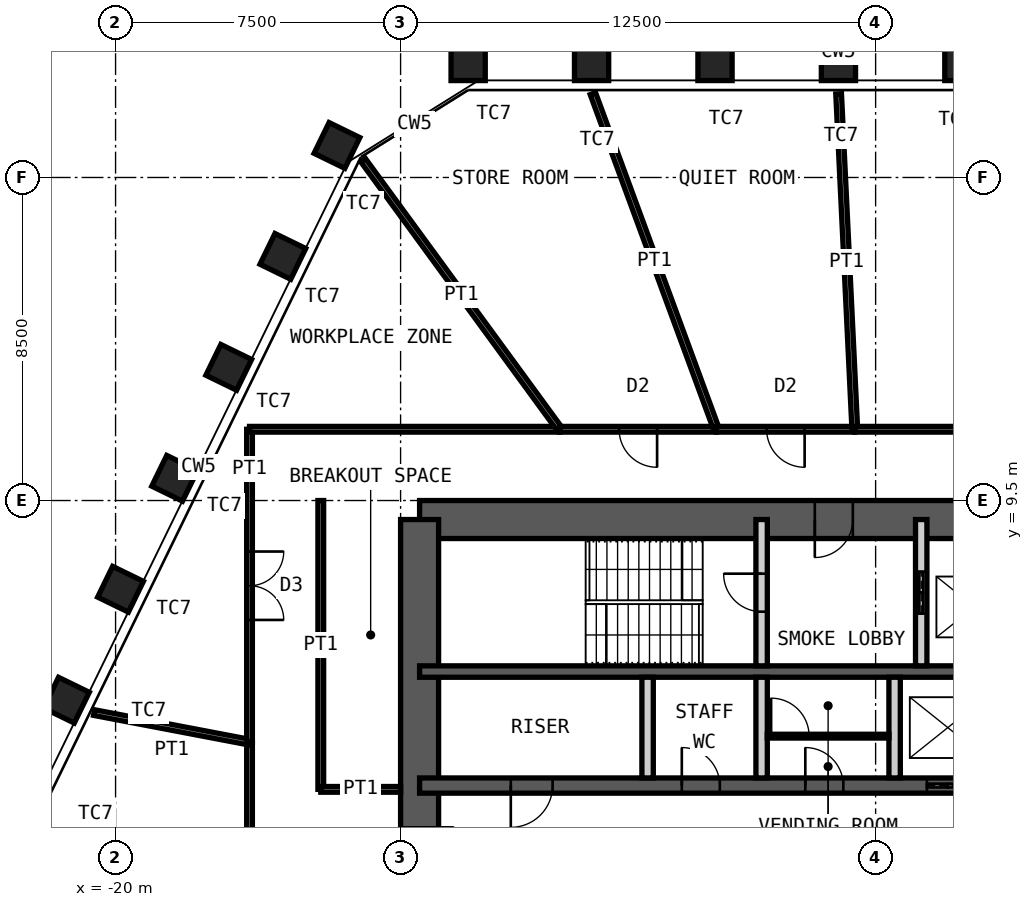
"""IFC4 building model, lengths in metres.
Left out: names, types, materials, properties, quantities, classifications, styles, units other than length and angle.
Written with IfcOpenShell. Run it as: python <this file> out.ifc"""

import sys

from ifc_helpers import new_model, si_unit, direction, frame, frame_2d, origin, origin_2d, place, context, subcontext, project, spatial, rectangle, hollow_rectangle, extrude, element, fill, save


model = new_model("IFC4")
c1 = context("Model", 3, precision=1e-05, world=origin(), true_north=direction((0.0, 1.0)))
c2 = subcontext(c1, "Body", "Model", "MODEL_VIEW")
j1 = project(units=[si_unit("LENGTHUNIT", "METRE"), si_unit("PLANEANGLEUNIT", "RADIAN")], contexts=[c1])
p1 = place(None, origin())
s1 = spatial("IfcSite", under=j1, at=p1, CompositionType="ELEMENT")
p2 = place(p1, origin())
s2 = spatial("IfcBuilding", under=s1, at=p2, CompositionType="ELEMENT")
p3 = place(p2, frame((0.0, 0.0, 270.4)))
s3 = spatial("IfcBuildingStorey", under=s2, at=p3, CompositionType="ELEMENT", Elevation=270.4)
for number, where, z_axis, x_axis in (
    (1, (-10.722, 21.0, 0.0), (0.0, 0.0, 1.0), (-1.0, 0.0, 0.0)),
    (2, (-7.474, 21.0, 0.0), (0.0, 0.0, 1.0), (-1.0, 0.0, 0.0)),
    (3, (-4.226, 21.0, 0.0), (0.0, 0.0, 1.0), (-1.0, 0.0, 0.0)),
    (4, (-0.978, 21.0, 0.0), (0.0, 0.0, 1.0), (-1.0, 0.0, 0.0)),
    (5, (2.27, 21.0, 0.0), (0.0, 0.0, 1.0), (-1.0, 0.0, 0.0)),
    (6, (-21.293, 4.246, 0.0), (0.0, 0.0, 1.0), (-0.438, -0.899, 0.0)),
    (7, (-19.87, 7.166, 0.0), (0.0, 0.0, 1.0), (-0.438, -0.899, 0.0)),
    (8, (-18.446, 10.085, 0.0), (0.0, 0.0, 1.0), (-0.438, -0.899, 0.0)),
    (9, (-17.022, 13.004, 0.0), (0.0, 0.0, 1.0), (-0.438, -0.899, 0.0)),
    (10, (-15.598, 15.924, 0.0), (0.0, 0.0, 1.0), (-0.438, -0.899, 0.0)),
    (11, (-14.174, 18.843, 0.0), (0.0, 0.0, 1.0), (-0.438, -0.899, 0.0)),
):
    element("IfcColumn", number, at=place(p3, frame(where, z_axis=z_axis, x_axis=x_axis)), inside=s3, PredefinedType="COLUMN", context=c2, shape_type="SweptSolid", body=[
        extrude(hollow_rectangle(XDim=0.9, YDim=0.9, WallThickness=0.06, at=origin_2d()), origin(), (0.0, 0.0, 1.0), 4.2),
    ])
p4 = place(p3, frame((-12.0, 9.0, 0.0), z_axis=(0.0, 0.0, 1.0), x_axis=(1.0, 0.0, 0.0)))
e12 = element("IfcWall", 12, at=p4, inside=s3, PredefinedType="SHEAR", context=c2, shape_type="SweptSolid", body=[
    extrude(rectangle(XDim=24.0, YDim=1.0, at=frame_2d((12.0, 0.0))), origin(), (0.0, 0.0, 1.0), 4.2),
])
p5 = place(p4, frame((10.4, 0.0, 0.0)))
e13 = element("IfcOpeningElement", 13, at=p5, cuts=e12, PredefinedType="OPENING", context=c2, shape_type="SweptSolid", body=[
    extrude(rectangle(XDim=1.0, YDim=2.1, at=frame_2d((0.5, 1.05))), frame((0.0, 0.51, 0.0), z_axis=(0.0, -1.0, 0.0), x_axis=(1.0, 0.0, 0.0)), (0.0, 0.0, 1.0), 1.02),
])
p6 = place(p4, frame((17.6, 0.0, 0.0)))
e14 = element("IfcOpeningElement", 14, at=p6, cuts=e12, PredefinedType="OPENING", context=c2, shape_type="SweptSolid", body=[
    extrude(rectangle(XDim=0.9, YDim=2.1, at=frame_2d((0.45, 1.05))), frame((0.0, 0.51, 0.0), z_axis=(0.0, -1.0, 0.0), x_axis=(1.0, 0.0, 0.0)), (0.0, 0.0, 1.0), 1.02),
])
p7 = place(p4, frame((21.9, 0.0, 0.0)))
e15 = element("IfcOpeningElement", 15, at=p7, cuts=e12, PredefinedType="OPENING", context=c2, shape_type="SweptSolid", body=[
    extrude(rectangle(XDim=0.9, YDim=2.1, at=frame_2d((0.45, 1.05))), frame((0.0, 0.51, 0.0), z_axis=(0.0, -1.0, 0.0), x_axis=(1.0, 0.0, 0.0)), (0.0, 0.0, 1.0), 1.02),
])
p8 = place(p3, frame((-12.0, -9.0, 0.0), z_axis=(0.0, 0.0, 1.0), x_axis=(0.0, 1.0, 0.0)))
e16 = element("IfcWall", 16, at=p8, inside=s3, PredefinedType="SHEAR", context=c2, shape_type="SweptSolid", body=[
    extrude(rectangle(XDim=18.0, YDim=1.0, at=frame_2d((9.0, 0.0))), origin(), (0.0, 0.0, 1.0), 4.2),
])
p9 = place(p8, frame((8.1, 0.0, 0.0)))
e17 = element("IfcOpeningElement", 17, at=p9, cuts=e16, PredefinedType="OPENING", context=c2, shape_type="SweptSolid", body=[
    extrude(rectangle(XDim=1.8, YDim=2.1, at=frame_2d((0.9, 1.05))), frame((0.0, 0.51, 0.0), z_axis=(0.0, -1.0, 0.0), x_axis=(1.0, 0.0, 0.0)), (0.0, 0.0, 1.0), 1.02),
])
p10 = place(p3, frame((-12.0, 5.0, 0.0), z_axis=(0.0, 0.0, 1.0), x_axis=(1.0, 0.0, 0.0)))
e18 = element("IfcWall", 18, at=p10, inside=s3, PredefinedType="SHEAR", context=c2, shape_type="SweptSolid", body=[
    extrude(rectangle(XDim=24.0, YDim=0.3, at=frame_2d((12.0, 0.0))), origin(), (0.0, 0.0, 1.0), 4.2),
])
p11 = place(p3, frame((-12.0, 2.0, 0.0), z_axis=(0.0, 0.0, 1.0), x_axis=(1.0, 0.0, 0.0)))
e19 = element("IfcWall", 19, at=p11, inside=s3, PredefinedType="SHEAR", context=c2, shape_type="SweptSolid", body=[
    extrude(rectangle(XDim=24.0, YDim=0.4, at=frame_2d((12.0, 0.0))), origin(), (0.0, 0.0, 1.0), 4.2),
])
p12 = place(p11, frame((2.4, 0.0, 0.0)))
e20 = element("IfcOpeningElement", 20, at=p12, cuts=e19, PredefinedType="OPENING", context=c2, shape_type="SweptSolid", body=[
    extrude(rectangle(XDim=1.1, YDim=2.1, at=frame_2d((0.55, 1.05))), frame((0.0, 0.21, 0.0), z_axis=(0.0, -1.0, 0.0), x_axis=(1.0, 0.0, 0.0)), (0.0, 0.0, 1.0), 0.42),
])
p13 = place(p11, frame((22.0, 0.0, 0.0)))
e21 = element("IfcOpeningElement", 21, at=p13, cuts=e19, PredefinedType="OPENING", context=c2, shape_type="SweptSolid", body=[
    extrude(rectangle(XDim=1.1, YDim=2.1, at=frame_2d((0.55, 1.05))), frame((0.0, 0.21, 0.0), z_axis=(0.0, -1.0, 0.0), x_axis=(1.0, 0.0, 0.0)), (0.0, 0.0, 1.0), 0.42),
])
p14 = place(p11, frame((10.15, 0.0, 0.0)))
e22 = element("IfcOpeningElement", 22, at=p14, cuts=e19, PredefinedType="OPENING", context=c2, shape_type="SweptSolid", body=[
    extrude(rectangle(XDim=1.0, YDim=2.1, at=frame_2d((0.5, 1.05))), frame((0.0, 0.21, 0.0), z_axis=(0.0, -1.0, 0.0), x_axis=(1.0, 0.0, 0.0)), (0.0, 0.0, 1.0), 0.42),
])
p15 = place(p11, frame((6.9, 0.0, 0.0)))
e23 = element("IfcOpeningElement", 23, at=p15, cuts=e19, PredefinedType="OPENING", context=c2, shape_type="SweptSolid", body=[
    extrude(rectangle(XDim=1.0, YDim=2.1, at=frame_2d((0.5, 1.05))), frame((0.0, 0.21, 0.0), z_axis=(0.0, -1.0, 0.0), x_axis=(1.0, 0.0, 0.0)), (0.0, 0.0, 1.0), 0.42),
])
p16 = place(p11, frame((13.35, 0.0, 0.0)))
e24 = element("IfcOpeningElement", 24, at=p16, cuts=e19, PredefinedType="OPENING", context=c2, shape_type="SweptSolid", body=[
    extrude(rectangle(XDim=1.1, YDim=2.4, at=frame_2d((0.55, 1.2))), frame((0.0, 0.21, 0.0), z_axis=(0.0, -1.0, 0.0), x_axis=(1.0, 0.0, 0.0)), (0.0, 0.0, 1.0), 0.42),
])
p17 = place(p11, frame((16.15, 0.0, 0.0)))
e25 = element("IfcOpeningElement", 25, at=p17, cuts=e19, PredefinedType="OPENING", context=c2, shape_type="SweptSolid", body=[
    extrude(rectangle(XDim=1.1, YDim=2.4, at=frame_2d((0.55, 1.2))), frame((0.0, 0.21, 0.0), z_axis=(0.0, -1.0, 0.0), x_axis=(1.0, 0.0, 0.0)), (0.0, 0.0, 1.0), 0.42),
])
p18 = place(p11, frame((19.0, 0.0, 0.0)))
e26 = element("IfcOpeningElement", 26, at=p18, cuts=e19, PredefinedType="OPENING", context=c2, shape_type="SweptSolid", body=[
    extrude(rectangle(XDim=1.0, YDim=2.1, at=frame_2d((0.5, 1.05))), frame((0.0, 0.21, 0.0), z_axis=(0.0, -1.0, 0.0), x_axis=(1.0, 0.0, 0.0)), (0.0, 0.0, 1.0), 0.42),
])
p19 = place(p3, frame((-3.0, 5.15, 0.0), z_axis=(0.0, 0.0, 1.0), x_axis=(0.0, 1.0, 0.0)))
e27 = element("IfcWall", 27, at=p19, inside=s3, PredefinedType="PARTITIONING", context=c2, shape_type="SweptSolid", body=[
    extrude(rectangle(XDim=3.85, YDim=0.3, at=frame_2d((1.925, 0.0))), origin(), (0.0, 0.0, 1.0), 3.98),
])
p20 = place(p19, frame((1.425, 0.0, 0.0)))
e28 = element("IfcOpeningElement", 28, at=p20, cuts=e27, PredefinedType="OPENING", context=c2, shape_type="SweptSolid", body=[
    extrude(rectangle(XDim=1.0, YDim=2.1, at=frame_2d((0.5, 1.05))), frame((0.0, 0.16, 0.0), z_axis=(0.0, -1.0, 0.0), x_axis=(1.0, 0.0, 0.0)), (0.0, 0.0, 1.0), 0.32),
])
p21 = place(p3, frame((1.2, 5.15, 0.0), z_axis=(0.0, 0.0, 1.0), x_axis=(0.0, 1.0, 0.0)))
e29 = element("IfcWall", 29, at=p21, inside=s3, PredefinedType="PARTITIONING", context=c2, shape_type="SweptSolid", body=[
    extrude(rectangle(XDim=3.85, YDim=0.3, at=frame_2d((1.925, 0.0))), origin(), (0.0, 0.0, 1.0), 3.98),
])
p22 = place(p21, frame((1.375, 0.0, 0.0)))
e30 = element("IfcOpeningElement", 30, at=p22, cuts=e29, PredefinedType="OPENING", context=c2, shape_type="SweptSolid", body=[
    extrude(rectangle(XDim=1.1, YDim=2.4, at=frame_2d((0.55, 1.2))), frame((0.0, 0.16, 0.0), z_axis=(0.0, -1.0, 0.0), x_axis=(1.0, 0.0, 0.0)), (0.0, 0.0, 1.0), 0.32),
])
for number, where, z_axis, x_axis in (
    (31, (-6.0, 2.2, 0.0), (0.0, 0.0, 1.0), (0.0, 1.0, 0.0)),
    (32, (-3.0, 2.2, 0.0), (0.0, 0.0, 1.0), (0.0, 1.0, 0.0)),
    (33, (0.5, 2.2, 0.0), (0.0, 0.0, 1.0), (0.0, 1.0, 0.0)),
):
    element("IfcWall", number, at=place(p3, frame(where, z_axis=z_axis, x_axis=x_axis)), inside=s3, PredefinedType="PARTITIONING", context=c2, shape_type="SweptSolid", body=[
        extrude(rectangle(XDim=2.65, YDim=0.3, at=frame_2d((1.325, 0.0))), origin(), (0.0, 0.0, 1.0), 3.98),
    ])
p23 = place(p3, frame((-2.85, 3.3, 0.0), z_axis=(0.0, 0.0, 1.0), x_axis=(1.0, 0.0, 0.0)))
e34 = element("IfcWall", 34, at=p23, inside=s3, PredefinedType="PARTITIONING", context=c2, shape_type="SweptSolid", body=[
    extrude(rectangle(XDim=3.2, YDim=0.1, at=frame_2d((1.6, 0.0))), origin(), (0.0, 0.0, 1.0), 3.98),
])
p24 = place(p23, frame((0.1, 0.0, 0.0)))
e35 = element("IfcOpeningElement", 35, at=p24, cuts=e34, PredefinedType="OPENING", context=c2, shape_type="SweptSolid", body=[
    extrude(rectangle(XDim=1.0, YDim=2.4, at=frame_2d((0.5, 1.2))), frame((0.0, 0.06, 0.0), z_axis=(0.0, -1.0, 0.0), x_axis=(1.0, 0.0, 0.0)), (0.0, 0.0, 1.0), 0.12),
])
p25 = place(p3, frame((-16.475, -4.351, 0.0), z_axis=(0.0, 0.0, 1.0), x_axis=(0.0, 1.0, 0.0)))
e36 = element("IfcWall", 36, at=p25, inside=s3, PredefinedType="PARTITIONING", context=c2, shape_type="SweptSolid", body=[
    extrude(rectangle(XDim=7.492, YDim=0.15, at=frame_2d((3.746, 0.0))), origin(), (0.0, 0.0, 1.0), 4.03),
])
p26 = place(p25, frame((3.246, 0.0, 0.0)))
e37 = element("IfcOpeningElement", 37, at=p26, cuts=e36, PredefinedType="OPENING", context=c2, shape_type="SweptSolid", body=[
    extrude(rectangle(XDim=1.0, YDim=2.4, at=frame_2d((0.5, 1.2))), frame((0.0, 0.085, 0.0), z_axis=(0.0, -1.0, 0.0), x_axis=(1.0, 0.0, 0.0)), (0.0, 0.0, 1.0), 0.17),
])
p27 = place(p3, frame((-20.566, 3.921, 0.0), z_axis=(0.0, 0.0, 1.0), x_axis=(0.982304172816, -0.187292584123, 0.0)))
e38 = element("IfcWall", 38, at=p27, inside=s3, PredefinedType="PARTITIONING", context=c2, shape_type="SweptSolid", body=[
    extrude(rectangle(XDim=4.165, YDim=0.15, at=frame_2d((2.083, 0.0))), origin(), (0.0, 0.0, 1.0), 3.33),
])
p28 = place(p3, frame((-16.475, 3.141, 0.0), z_axis=(0.0, 0.0, 1.0), x_axis=(0.0, 1.0, 0.0)))
e39 = element("IfcWall", 39, at=p28, inside=s3, PredefinedType="PARTITIONING", context=c2, shape_type="SweptSolid", body=[
    extrude(rectangle(XDim=8.234, YDim=0.15, at=frame_2d((4.117, 0.0))), origin(), (0.0, 0.0, 1.0), 4.03),
])
p29 = place(p28, frame((3.217, 0.0, 0.0)))
e40 = element("IfcOpeningElement", 40, at=p29, cuts=e39, PredefinedType="OPENING", context=c2, shape_type="SweptSolid", body=[
    extrude(rectangle(XDim=1.8, YDim=2.4, at=frame_2d((0.9, 1.2))), frame((0.0, 0.085, 0.0), z_axis=(0.0, -1.0, 0.0), x_axis=(1.0, 0.0, 0.0)), (0.0, 0.0, 1.0), 0.17),
])
p30 = place(p3, frame((-16.475, 11.375, 0.0), z_axis=(0.0, 0.0, 1.0), x_axis=(1.0, 0.0, 0.0)))
e41 = element("IfcWall", 41, at=p30, inside=s3, PredefinedType="PARTITIONING", context=c2, shape_type="SweptSolid", body=[
    extrude(rectangle(XDim=8.163, YDim=0.15, at=frame_2d((4.082, 0.0))), origin(), (0.0, 0.0, 1.0), 4.03),
])
p31 = place(p3, frame((-13.486, 18.455, 0.0), z_axis=(0.0, 0.0, 1.0), x_axis=(0.589997742419, -0.807404894672, 0.0)))
e42 = element("IfcWall", 42, at=p31, inside=s3, PredefinedType="PARTITIONING", context=c2, shape_type="SweptSolid", body=[
    extrude(rectangle(XDim=8.769, YDim=0.15, at=frame_2d((4.385, 0.0))), origin(), (0.0, 0.0, 1.0), 2.93),
])
p32 = place(p3, frame((-8.312, 11.375, 0.0), z_axis=(0.0, 0.0, 1.0), x_axis=(1.0, 0.0, 0.0)))
e43 = element("IfcWall", 43, at=p32, inside=s3, PredefinedType="PARTITIONING", context=c2, shape_type="SweptSolid", body=[
    extrude(rectangle(XDim=4.124, YDim=0.15, at=frame_2d((2.062, 0.0))), origin(), (0.0, 0.0, 1.0), 4.03),
])
p33 = place(p32, frame((1.562, 0.0, 0.0)))
e44 = element("IfcOpeningElement", 44, at=p33, cuts=e43, PredefinedType="OPENING", context=c2, shape_type="SweptSolid", body=[
    extrude(rectangle(XDim=1.0, YDim=2.4, at=frame_2d((0.5, 1.2))), frame((0.0, 0.085, 0.0), z_axis=(0.0, -1.0, 0.0), x_axis=(1.0, 0.0, 0.0)), (0.0, 0.0, 1.0), 0.17),
])
p34 = place(p3, frame((-7.44, 20.206, 0.0), z_axis=(0.0, 0.0, 1.0), x_axis=(0.345510588088, -0.938414851502, 0.0)))
e45 = element("IfcWall", 45, at=p34, inside=s3, PredefinedType="PARTITIONING", context=c2, shape_type="SweptSolid", body=[
    extrude(rectangle(XDim=9.411, YDim=0.15, at=frame_2d((4.705, 0.0))), origin(), (0.0, 0.0, 1.0), 3.33),
])
p35 = place(p3, frame((-4.188, 11.375, 0.0), z_axis=(0.0, 0.0, 1.0), x_axis=(1.0, 0.0, 0.0)))
e46 = element("IfcWall", 46, at=p35, inside=s3, PredefinedType="PARTITIONING", context=c2, shape_type="SweptSolid", body=[
    extrude(rectangle(XDim=3.64, YDim=0.15, at=frame_2d((1.82, 0.0))), origin(), (0.0, 0.0, 1.0), 4.03),
])
p36 = place(p35, frame((1.32, 0.0, 0.0)))
e47 = element("IfcOpeningElement", 47, at=p36, cuts=e46, PredefinedType="OPENING", context=c2, shape_type="SweptSolid", body=[
    extrude(rectangle(XDim=1.0, YDim=2.4, at=frame_2d((0.5, 1.2))), frame((0.0, 0.085, 0.0), z_axis=(0.0, -1.0, 0.0), x_axis=(1.0, 0.0, 0.0)), (0.0, 0.0, 1.0), 0.17),
])
p37 = place(p3, frame((-0.973, 20.2, 0.0), z_axis=(0.0, 0.0, 1.0), x_axis=(0.048134910622, -0.998840843368, 0.0)))
e48 = element("IfcWall", 48, at=p37, inside=s3, PredefinedType="PARTITIONING", context=c2, shape_type="SweptSolid", body=[
    extrude(rectangle(XDim=8.835, YDim=0.15, at=frame_2d((4.418, 0.0))), origin(), (0.0, 0.0, 1.0), 3.33),
])
p38 = place(p3, frame((-0.548, 11.375, 0.0), z_axis=(0.0, 0.0, 1.0), x_axis=(1.0, 0.0, 0.0)))
e49 = element("IfcWall", 49, at=p38, inside=s3, PredefinedType="PARTITIONING", context=c2, shape_type="SweptSolid", body=[
    extrude(rectangle(XDim=10.365, YDim=0.15, at=frame_2d((5.182, 0.0))), origin(), (0.0, 0.0, 1.0), 4.03),
])
p39 = place(p38, frame((4.282, 0.0, 0.0)))
e50 = element("IfcOpeningElement", 50, at=p39, cuts=e49, PredefinedType="OPENING", context=c2, shape_type="SweptSolid", body=[
    extrude(rectangle(XDim=1.8, YDim=2.4, at=frame_2d((0.9, 1.2))), frame((0.0, 0.085, 0.0), z_axis=(0.0, -1.0, 0.0), x_axis=(1.0, 0.0, 0.0)), (0.0, 0.0, 1.0), 0.17),
])
p40 = place(p3, frame((-14.6, 1.9, 0.0), z_axis=(0.0, 0.0, 1.0), x_axis=(0.0, 1.0, 0.0)))
e51 = element("IfcWall", 51, at=p40, inside=s3, PredefinedType="PARTITIONING", context=c2, shape_type="SweptSolid", body=[
    extrude(rectangle(XDim=7.6, YDim=0.15, at=frame_2d((3.8, 0.0))), origin(), (0.0, 0.0, 1.0), 4.03),
])
p41 = place(p3, frame((-12.5, 1.9, 0.0), z_axis=(0.0, 0.0, 1.0), x_axis=(-1.0, 0.0, 0.0)))
e52 = element("IfcWall", 52, at=p41, inside=s3, PredefinedType="PARTITIONING", context=c2, shape_type="SweptSolid", body=[
    extrude(rectangle(XDim=2.1, YDim=0.15, at=frame_2d((1.05, 0.0))), origin(), (0.0, 0.0, 1.0), 3.53),
])
p42 = place(p5, origin())
e53 = element("IfcDoor", 53, at=p42, inside=s3, OperationType="SINGLE_SWING_LEFT", PredefinedType="DOOR", context=c2, shape_type="SweptSolid", body=[
    extrude(rectangle(XDim=1.0, YDim=2.1, at=frame_2d((0.5, 1.05))), frame((0.0, 0.025, 0.0), z_axis=(0.0, -1.0, 0.0), x_axis=(1.0, 0.0, 0.0)), (0.0, 0.0, 1.0), 0.05),
])
fill(e13, e53)
p43 = place(p20, origin())
e54 = element("IfcDoor", 54, at=p43, inside=s3, OperationType="SINGLE_SWING_LEFT", PredefinedType="DOOR", context=c2, shape_type="SweptSolid", body=[
    extrude(rectangle(XDim=1.0, YDim=2.1, at=frame_2d((0.5, 1.05))), frame((0.0, 0.025, 0.0), z_axis=(0.0, -1.0, 0.0), x_axis=(1.0, 0.0, 0.0)), (0.0, 0.0, 1.0), 0.05),
])
fill(e28, e54)
p44 = place(p12, origin())
e55 = element("IfcDoor", 55, at=p44, inside=s3, OperationType="SINGLE_SWING_LEFT", PredefinedType="DOOR", context=c2, shape_type="SweptSolid", body=[
    extrude(rectangle(XDim=1.1, YDim=2.1, at=frame_2d((0.55, 1.05))), frame((0.0, 0.025, 0.0), z_axis=(0.0, -1.0, 0.0), x_axis=(1.0, 0.0, 0.0)), (0.0, 0.0, 1.0), 0.05),
])
fill(e20, e55)
p45 = place(p14, origin())
e56 = element("IfcDoor", 56, at=p45, inside=s3, OperationType="SINGLE_SWING_RIGHT", PredefinedType="DOOR", context=c2, shape_type="SweptSolid", body=[
    extrude(rectangle(XDim=1.0, YDim=2.1, at=frame_2d((0.5, 1.05))), frame((0.0, 0.025, 0.0), z_axis=(0.0, -1.0, 0.0), x_axis=(1.0, 0.0, 0.0)), (0.0, 0.0, 1.0), 0.05),
])
fill(e22, e56)
p46 = place(p9, origin())
e57 = element("IfcDoor", 57, at=p46, inside=s3, OperationType="DOUBLE_DOOR_DOUBLE_SWING", PredefinedType="DOOR", context=c2, shape_type="SweptSolid", body=[
    extrude(rectangle(XDim=1.8, YDim=2.1, at=frame_2d((0.9, 1.05))), frame((0.0, 0.025, 0.0), z_axis=(0.0, -1.0, 0.0), x_axis=(1.0, 0.0, 0.0)), (0.0, 0.0, 1.0), 0.05),
])
fill(e17, e57)
p47 = place(p22, origin())
e58 = element("IfcDoor", 58, at=p47, inside=s3, OperationType="DOUBLE_DOOR_SLIDING", PredefinedType="DOOR", context=c2, shape_type="SweptSolid", body=[
    extrude(rectangle(XDim=1.1, YDim=2.4, at=frame_2d((0.55, 1.2))), frame((0.0, 0.025, 0.0), z_axis=(0.0, -1.0, 0.0), x_axis=(1.0, 0.0, 0.0)), (0.0, 0.0, 1.0), 0.05),
])
fill(e30, e58)
p48 = place(p15, origin())
e59 = element("IfcDoor", 59, at=p48, inside=s3, OperationType="SINGLE_SWING_RIGHT", PredefinedType="DOOR", context=c2, shape_type="SweptSolid", body=[
    extrude(rectangle(XDim=1.0, YDim=2.1, at=frame_2d((0.5, 1.05))), frame((0.0, 0.025, 0.0), z_axis=(0.0, -1.0, 0.0), x_axis=(1.0, 0.0, 0.0)), (0.0, 0.0, 1.0), 0.05),
])
fill(e23, e59)
p49 = place(p16, origin())
e60 = element("IfcDoor", 60, at=p49, inside=s3, OperationType="DOUBLE_DOOR_SLIDING", PredefinedType="DOOR", context=c2, shape_type="SweptSolid", body=[
    extrude(rectangle(XDim=1.1, YDim=2.4, at=frame_2d((0.55, 1.2))), frame((0.0, 0.025, 0.0), z_axis=(0.0, -1.0, 0.0), x_axis=(1.0, 0.0, 0.0)), (0.0, 0.0, 1.0), 0.05),
])
fill(e24, e60)
p50 = place(p24, origin())
e61 = element("IfcDoor", 61, at=p50, inside=s3, OperationType="SINGLE_SWING_RIGHT", PredefinedType="DOOR", context=c2, shape_type="SweptSolid", body=[
    extrude(rectangle(XDim=1.0, YDim=2.4, at=frame_2d((0.5, 1.2))), frame((0.0, 0.025, 0.0), z_axis=(0.0, -1.0, 0.0), x_axis=(1.0, 0.0, 0.0)), (0.0, 0.0, 1.0), 0.05),
])
fill(e35, e61)
p51 = place(p29, origin())
e62 = element("IfcDoor", 62, at=p51, inside=s3, OperationType="DOUBLE_DOOR_DOUBLE_SWING", PredefinedType="DOOR", context=c2, shape_type="SweptSolid", body=[
    extrude(rectangle(XDim=1.8, YDim=2.4, at=frame_2d((0.9, 1.2))), frame((0.0, 0.025, 0.0), z_axis=(0.0, -1.0, 0.0), x_axis=(1.0, 0.0, 0.0)), (0.0, 0.0, 1.0), 0.05),
])
fill(e40, e62)
p52 = place(p33, origin())
e63 = element("IfcDoor", 63, at=p52, inside=s3, OperationType="SINGLE_SWING_RIGHT", PredefinedType="DOOR", context=c2, shape_type="SweptSolid", body=[
    extrude(rectangle(XDim=1.0, YDim=2.4, at=frame_2d((0.5, 1.2))), frame((0.0, 0.025, 0.0), z_axis=(0.0, -1.0, 0.0), x_axis=(1.0, 0.0, 0.0)), (0.0, 0.0, 1.0), 0.05),
])
fill(e44, e63)
p53 = place(p36, origin())
e64 = element("IfcDoor", 64, at=p53, inside=s3, OperationType="SINGLE_SWING_RIGHT", PredefinedType="DOOR", context=c2, shape_type="SweptSolid", body=[
    extrude(rectangle(XDim=1.0, YDim=2.4, at=frame_2d((0.5, 1.2))), frame((0.0, 0.025, 0.0), z_axis=(0.0, -1.0, 0.0), x_axis=(1.0, 0.0, 0.0)), (0.0, 0.0, 1.0), 0.05),
])
fill(e47, e64)
save(model, sys.argv[1])
